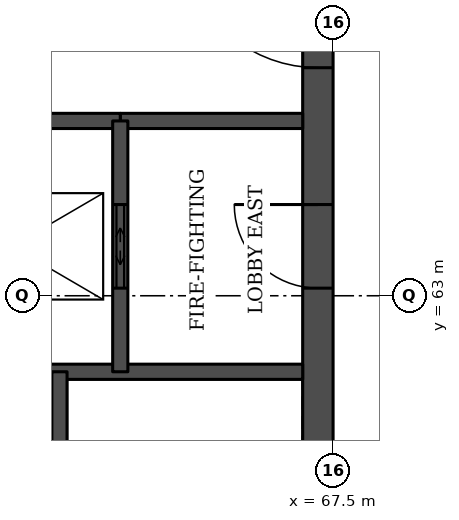
"""IFC4 building model, lengths in metres.
Left out: names, types, materials, properties, quantities, classifications, styles, units other than length and angle.
Written with IfcOpenShell. Run it as: python <this file> out.ifc"""

import sys

from ifc_helpers import new_model, si_unit, direction, frame, frame_2d, origin, place, context, subcontext, project, spatial, rectangle, extrude, element, fill, save


model = new_model("IFC4")
c1 = context("Model", 3, precision=1e-05, world=origin(), true_north=direction((0.0, 1.0)))
c2 = subcontext(c1, "Body", "Model", "MODEL_VIEW")
j1 = project(units=[si_unit("LENGTHUNIT", "METRE"), si_unit("PLANEANGLEUNIT", "RADIAN")], contexts=[c1])
p1 = place(None, origin())
s1 = spatial("IfcSite", under=j1, at=p1, CompositionType="ELEMENT")
p2 = place(p1, origin())
s2 = spatial("IfcBuilding", under=s1, at=p2, CompositionType="ELEMENT")
p3 = place(p2, frame((0.0, 0.0, 184.7)))
s3 = spatial("IfcBuildingStorey", under=s2, at=p3, CompositionType="ELEMENT", Elevation=184.7)
p4 = place(p3, frame((67.3, 49.5, 0.0), z_axis=(0.0, 0.0, 1.0), x_axis=(0.0, 1.0, 0.0)))
e1 = element("IfcWall", 1, at=p4, inside=s3, PredefinedType="SHEAR", context=c2, shape_type="SweptSolid", body=[
    extrude(rectangle(XDim=22.5, YDim=0.4, at=frame_2d((11.25, 0.0))), origin(), (0.0, 0.0, 1.0), 3.7),
])
p5 = place(p4, frame((4.2, 0.0, 0.0)))
e2 = element("IfcOpeningElement", 2, at=p5, cuts=e1, PredefinedType="OPENING", context=c2, shape_type="SweptSolid", body=[
    extrude(rectangle(XDim=1.8, YDim=2.1, at=frame_2d((0.9, 1.05))), frame((0.0, 0.21, 0.0), z_axis=(0.0, -1.0, 0.0), x_axis=(1.0, 0.0, 0.0)), (0.0, 0.0, 1.0), 0.42),
])
p6 = place(p4, frame((6.9, 0.0, 0.0)))
e3 = element("IfcOpeningElement", 3, at=p6, cuts=e1, PredefinedType="OPENING", context=c2, shape_type="SweptSolid", body=[
    extrude(rectangle(XDim=1.1, YDim=2.1, at=frame_2d((0.55, 1.05))), frame((0.0, 0.21, 0.0), z_axis=(0.0, -1.0, 0.0), x_axis=(1.0, 0.0, 0.0)), (0.0, 0.0, 1.0), 0.42),
])
p7 = place(p4, frame((13.6, 0.0, 0.0)))
e4 = element("IfcOpeningElement", 4, at=p7, cuts=e1, PredefinedType="OPENING", context=c2, shape_type="SweptSolid", body=[
    extrude(rectangle(XDim=1.1, YDim=2.1, at=frame_2d((0.55, 1.05))), frame((0.0, 0.21, 0.0), z_axis=(0.0, -1.0, 0.0), x_axis=(1.0, 0.0, 0.0)), (0.0, 0.0, 1.0), 0.42),
])
p8 = place(p4, frame((16.5, 0.0, 0.0)))
e5 = element("IfcOpeningElement", 5, at=p8, cuts=e1, PredefinedType="OPENING", context=c2, shape_type="SweptSolid", body=[
    extrude(rectangle(XDim=1.8, YDim=2.1, at=frame_2d((0.9, 1.05))), frame((0.0, 0.21, 0.0), z_axis=(0.0, -1.0, 0.0), x_axis=(1.0, 0.0, 0.0)), (0.0, 0.0, 1.0), 0.42),
])
p9 = place(p3, frame((61.85, 62.0, 0.0), z_axis=(0.0, 0.0, 1.0), x_axis=(1.0, 0.0, 0.0)))
e6 = element("IfcWall", 6, at=p9, inside=s3, PredefinedType="SOLIDWALL", context=c2, shape_type="SweptSolid", body=[
    extrude(rectangle(XDim=5.25, YDim=0.2, at=frame_2d((2.625, 0.0))), origin(), (0.0, 0.0, 1.0), 3.55),
])
p10 = place(p3, frame((64.7, 65.3, 0.0), z_axis=(0.0, 0.0, 1.0), x_axis=(1.0, 0.0, 0.0)))
e7 = element("IfcWall", 7, at=p10, inside=s3, PredefinedType="SOLIDWALL", context=c2, shape_type="SweptSolid", body=[
    extrude(rectangle(XDim=2.4, YDim=0.2, at=frame_2d((1.2, 0.0))), origin(), (0.0, 0.0, 1.0), 3.55),
])
p11 = place(p3, frame((47.8, 65.3, 0.0), z_axis=(0.0, 0.0, 1.0), x_axis=(1.0, 0.0, 0.0)))
e8 = element("IfcWall", 8, at=p11, inside=s3, PredefinedType="SOLIDWALL", context=c2, shape_type="SweptSolid", body=[
    extrude(rectangle(XDim=16.9, YDim=0.2, at=frame_2d((8.45, 0.0))), origin(), (0.0, 0.0, 1.0), 3.55),
])
p12 = place(p11, frame((3.65, 0.0, 0.0)))
e9 = element("IfcOpeningElement", 9, at=p12, cuts=e8, PredefinedType="OPENING", context=c2, shape_type="SweptSolid", body=[
    extrude(rectangle(XDim=1.2, YDim=2.1, at=frame_2d((0.6, 1.05))), frame((0.0, 0.11, 0.0), z_axis=(0.0, -1.0, 0.0), x_axis=(1.0, 0.0, 0.0)), (0.0, 0.0, 1.0), 0.22),
])
p13 = place(p11, frame((6.45, 0.0, 0.0)))
e10 = element("IfcOpeningElement", 10, at=p13, cuts=e8, PredefinedType="OPENING", context=c2, shape_type="SweptSolid", body=[
    extrude(rectangle(XDim=1.2, YDim=2.1, at=frame_2d((0.6, 1.05))), frame((0.0, 0.11, 0.0), z_axis=(0.0, -1.0, 0.0), x_axis=(1.0, 0.0, 0.0)), (0.0, 0.0, 1.0), 0.22),
])
p14 = place(p11, frame((9.25, 0.0, 0.0)))
e11 = element("IfcOpeningElement", 11, at=p14, cuts=e8, PredefinedType="OPENING", context=c2, shape_type="SweptSolid", body=[
    extrude(rectangle(XDim=1.2, YDim=2.1, at=frame_2d((0.6, 1.05))), frame((0.0, 0.11, 0.0), z_axis=(0.0, -1.0, 0.0), x_axis=(1.0, 0.0, 0.0)), (0.0, 0.0, 1.0), 0.22),
])
p15 = place(p11, frame((12.05, 0.0, 0.0)))
e12 = element("IfcOpeningElement", 12, at=p15, cuts=e8, PredefinedType="OPENING", context=c2, shape_type="SweptSolid", body=[
    extrude(rectangle(XDim=1.2, YDim=2.1, at=frame_2d((0.6, 1.05))), frame((0.0, 0.11, 0.0), z_axis=(0.0, -1.0, 0.0), x_axis=(1.0, 0.0, 0.0)), (0.0, 0.0, 1.0), 0.22),
])
p16 = place(p3, frame((63.9, 56.2, 0.0), z_axis=(0.0, 0.0, 1.0), x_axis=(0.0, 1.0, 0.0)))
e13 = element("IfcWall", 13, at=p16, inside=s3, PredefinedType="SOLIDWALL", context=c2, shape_type="SweptSolid", body=[
    extrude(rectangle(XDim=5.8, YDim=0.2, at=frame_2d((2.9, 0.0))), origin(), (0.0, 0.0, 1.0), 3.55),
])
p17 = place(p3, frame((64.7, 62.0, 0.0), z_axis=(0.0, 0.0, 1.0), x_axis=(0.0, 1.0, 0.0)))
e14 = element("IfcWall", 14, at=p17, inside=s3, PredefinedType="SOLIDWALL", context=c2, shape_type="SweptSolid", body=[
    extrude(rectangle(XDim=3.3, YDim=0.2, at=frame_2d((1.65, 0.0))), origin(), (0.0, 0.0, 1.0), 3.55),
])
p18 = place(p17, frame((1.1, 0.0, 0.0)))
e15 = element("IfcOpeningElement", 15, at=p18, cuts=e14, PredefinedType="OPENING", context=c2, shape_type="SweptSolid", body=[
    extrude(rectangle(XDim=1.1, YDim=2.1, at=frame_2d((0.55, 1.05))), frame((0.0, 0.11, 0.0), z_axis=(0.0, -1.0, 0.0), x_axis=(1.0, 0.0, 0.0)), (0.0, 0.0, 1.0), 0.22),
])
p19 = place(p18, origin())
e16 = element("IfcDoor", 16, at=p19, inside=s3, OperationType="DOUBLE_DOOR_SLIDING", PredefinedType="DOOR", context=c2, shape_type="SweptSolid", body=[
    extrude(rectangle(XDim=1.1, YDim=2.1, at=frame_2d((0.55, 1.05))), frame((0.0, 0.025, 0.0), z_axis=(0.0, -1.0, 0.0), x_axis=(1.0, 0.0, 0.0)), (0.0, 0.0, 1.0), 0.05),
])
fill(e15, e16)
p20 = place(p7, origin())
e17 = element("IfcDoor", 17, at=p20, inside=s3, OperationType="SINGLE_SWING_RIGHT", PredefinedType="DOOR", context=c2, shape_type="SweptSolid", body=[
    extrude(rectangle(XDim=1.1, YDim=2.1, at=frame_2d((0.55, 1.05))), frame((0.0, 0.025, 0.0), z_axis=(0.0, -1.0, 0.0), x_axis=(1.0, 0.0, 0.0)), (0.0, 0.0, 1.0), 0.05),
])
fill(e4, e17)
p21 = place(p8, origin())
e18 = element("IfcDoor", 18, at=p21, inside=s3, OperationType="SINGLE_SWING_RIGHT", PredefinedType="DOOR", context=c2, shape_type="SweptSolid", body=[
    extrude(rectangle(XDim=1.8, YDim=2.1, at=frame_2d((0.9, 1.05))), frame((0.0, 0.025, 0.0), z_axis=(0.0, -1.0, 0.0), x_axis=(1.0, 0.0, 0.0)), (0.0, 0.0, 1.0), 0.05),
])
fill(e5, e18)
save(model, sys.argv[1])
